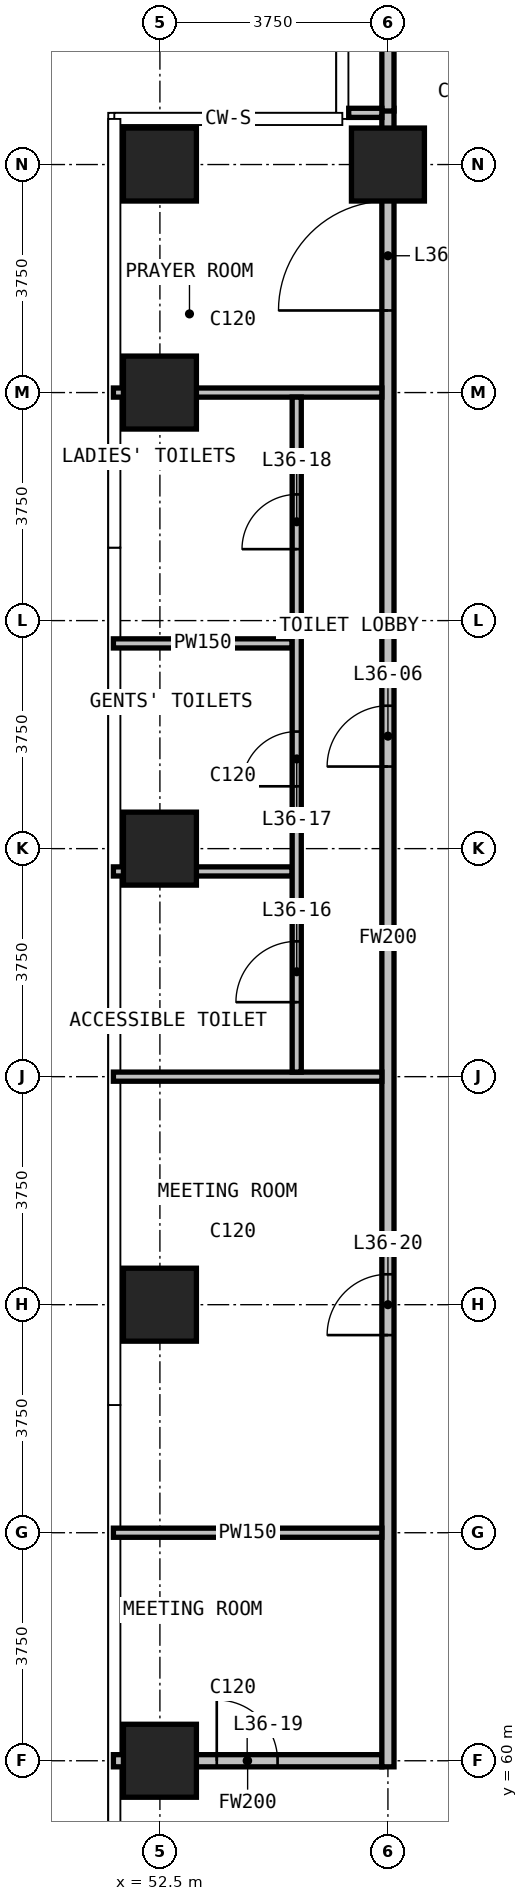
"""IFC4 building model, lengths in metres.
Left out: names, types, materials, properties, quantities, classifications, styles, units other than length and angle.
Written with IfcOpenShell. Run it as: python <this file> out.ifc"""

import sys

from ifc_helpers import new_model, si_unit, direction, frame, frame_2d, origin, origin_2d, place, context, subcontext, project, spatial, rectangle, extrude, element, fill, save


model = new_model("IFC4")
c1 = context("Model", 3, precision=1e-05, world=origin(), true_north=direction((0.0, 1.0)))
c2 = subcontext(c1, "Body", "Model", "MODEL_VIEW")
j1 = project(units=[si_unit("LENGTHUNIT", "METRE"), si_unit("PLANEANGLEUNIT", "RADIAN")], contexts=[c1])
p1 = place(None, origin())
s1 = spatial("IfcSite", under=j1, at=p1, CompositionType="ELEMENT")
p2 = place(p1, origin())
s2 = spatial("IfcBuilding", under=s1, at=p2, CompositionType="ELEMENT")
p3 = place(p2, frame((0.0, 0.0, 143.2)))
s3 = spatial("IfcBuildingStorey", under=s2, at=p3, CompositionType="ELEMENT", Elevation=143.2)
for number, where, z_axis, x_axis in (
    (1, (52.5, 60.0, 0.0), (0.0, 0.0, 1.0), (1.0, 0.0, 0.0)),
    (2, (52.5, 67.5, 0.0), (0.0, 0.0, 1.0), (1.0, 0.0, 0.0)),
    (3, (52.5, 75.0, 0.0), (0.0, 0.0, 1.0), (1.0, 0.0, 0.0)),
    (4, (52.5, 82.5, 0.0), (0.0, 0.0, 1.0), (1.0, 0.0, 0.0)),
    (5, (52.5, 86.25, 0.0), (0.0, 0.0, 1.0), (1.0, 0.0, 0.0)),
    (6, (56.25, 86.25, 0.0), (0.0, 0.0, 1.0), (1.0, 0.0, 0.0)),
):
    element("IfcColumn", number, at=place(p3, frame(where, z_axis=z_axis, x_axis=x_axis)), inside=s3, PredefinedType="COLUMN", context=c2, shape_type="SweptSolid", body=[
        extrude(rectangle(XDim=1.2, YDim=1.2, at=origin_2d()), origin(), (0.0, 0.0, 1.0), 4.5),
    ])
p4 = place(p3, frame((51.735, 60.0, 0.0), z_axis=(0.0, 0.0, 1.0), x_axis=(1.0, 0.0, 0.0)))
e7 = element("IfcWall", 7, at=p4, inside=s3, PredefinedType="PARTITIONING", context=c2, shape_type="SweptSolid", body=[
    extrude(rectangle(XDim=4.415, YDim=0.2, at=frame_2d((2.208, 0.0))), origin(), (0.0, 0.0, 1.0), 4.2),
])
p5 = place(p4, frame((1.7, 0.0, 0.0)))
e8 = element("IfcOpeningElement", 8, at=p5, cuts=e7, PredefinedType="OPENING", context=c2, shape_type="SweptSolid", body=[
    extrude(rectangle(XDim=1.0, YDim=2.2, at=frame_2d((0.5, 1.1))), frame((0.0, 0.11, 0.0), z_axis=(0.0, -1.0, 0.0), x_axis=(1.0, 0.0, 0.0)), (0.0, 0.0, 1.0), 0.22),
])
p6 = place(p3, frame((56.25, 59.9, 0.0), z_axis=(0.0, 0.0, 1.0), x_axis=(0.0, 1.0, 0.0)))
e9 = element("IfcWall", 9, at=p6, inside=s3, PredefinedType="PARTITIONING", context=c2, shape_type="SweptSolid", body=[
    extrude(rectangle(XDim=27.275, YDim=0.2, at=frame_2d((13.638, 0.0))), origin(), (0.0, 0.0, 1.0), 4.2),
])
p7 = place(p6, frame((16.45, 0.0, 0.0)))
e10 = element("IfcOpeningElement", 10, at=p7, cuts=e9, PredefinedType="OPENING", context=c2, shape_type="SweptSolid", body=[
    extrude(rectangle(XDim=1.0, YDim=2.2, at=frame_2d((0.5, 1.1))), frame((0.0, 0.11, 0.0), z_axis=(0.0, -1.0, 0.0), x_axis=(1.0, 0.0, 0.0)), (0.0, 0.0, 1.0), 0.22),
])
p8 = place(p6, frame((7.1, 0.0, 0.0)))
e11 = element("IfcOpeningElement", 11, at=p8, cuts=e9, PredefinedType="OPENING", context=c2, shape_type="SweptSolid", body=[
    extrude(rectangle(XDim=1.0, YDim=2.2, at=frame_2d((0.5, 1.1))), frame((0.0, 0.11, 0.0), z_axis=(0.0, -1.0, 0.0), x_axis=(1.0, 0.0, 0.0)), (0.0, 0.0, 1.0), 0.22),
])
p9 = place(p6, frame((23.95, 0.0, 0.0)))
e12 = element("IfcOpeningElement", 12, at=p9, cuts=e9, PredefinedType="OPENING", context=c2, shape_type="SweptSolid", body=[
    extrude(rectangle(XDim=1.8, YDim=2.2, at=frame_2d((0.9, 1.1))), frame((0.0, 0.11, 0.0), z_axis=(0.0, -1.0, 0.0), x_axis=(1.0, 0.0, 0.0)), (0.0, 0.0, 1.0), 0.22),
])
p10 = place(p3, frame((56.25, 87.13, 0.0), z_axis=(0.0, 0.0, 1.0), x_axis=(0.0, 1.0, 0.0)))
e13 = element("IfcWall", 13, at=p10, inside=s3, PredefinedType="PARTITIONING", context=c2, shape_type="SweptSolid", body=[
    extrude(rectangle(XDim=3.515, YDim=0.2, at=frame_2d((1.758, 0.0))), origin(), (0.0, 0.0, 1.0), 4.2),
])
for number, where, z_axis, x_axis in (
    (14, (51.735, 63.75, 0.0), (0.0, 0.0, 1.0), (1.0, 0.0, 0.0)),
    (15, (51.735, 71.25, 0.0), (0.0, 0.0, 1.0), (1.0, 0.0, 0.0)),
):
    element("IfcWall", number, at=place(p3, frame(where, z_axis=z_axis, x_axis=x_axis)), inside=s3, PredefinedType="PARTITIONING", context=c2, shape_type="SweptSolid", body=[
        extrude(rectangle(XDim=4.415, YDim=0.15, at=frame_2d((2.208, 0.0))), origin(), (0.0, 0.0, 1.0), 4.2),
    ])
for number, where, z_axis, x_axis in (
    (16, (51.735, 74.625, 0.0), (0.0, 0.0, 1.0), (1.0, 0.0, 0.0)),
    (17, (51.735, 78.375, 0.0), (0.0, 0.0, 1.0), (1.0, 0.0, 0.0)),
):
    element("IfcWall", number, at=place(p3, frame(where, z_axis=z_axis, x_axis=x_axis)), inside=s3, PredefinedType="PARTITIONING", context=c2, shape_type="SweptSolid", body=[
        extrude(rectangle(XDim=2.94, YDim=0.15, at=frame_2d((1.47, 0.0))), origin(), (0.0, 0.0, 1.0), 4.2),
    ])
p11 = place(p3, frame((51.735, 82.5, 0.0), z_axis=(0.0, 0.0, 1.0), x_axis=(1.0, 0.0, 0.0)))
e18 = element("IfcWall", 18, at=p11, inside=s3, PredefinedType="PARTITIONING", context=c2, shape_type="SweptSolid", body=[
    extrude(rectangle(XDim=4.415, YDim=0.15, at=frame_2d((2.208, 0.0))), origin(), (0.0, 0.0, 1.0), 4.2),
])
p12 = place(p3, frame((55.605, 87.1, 0.0), z_axis=(0.0, 0.0, 1.0), x_axis=(1.0, 0.0, 0.0)))
e19 = element("IfcWall", 19, at=p12, inside=s3, PredefinedType="PARTITIONING", context=c2, shape_type="SweptSolid", body=[
    extrude(rectangle(XDim=0.545, YDim=0.15, at=frame_2d((0.272, 0.0))), origin(), (0.0, 0.0, 1.0), 4.2),
])
p13 = place(p3, frame((54.75, 71.325, 0.0), z_axis=(0.0, 0.0, 1.0), x_axis=(0.0, 1.0, 0.0)))
e20 = element("IfcWall", 20, at=p13, inside=s3, PredefinedType="PARTITIONING", context=c2, shape_type="SweptSolid", body=[
    extrude(rectangle(XDim=11.1, YDim=0.15, at=frame_2d((5.55, 0.0))), origin(), (0.0, 0.0, 1.0), 4.2),
])
p14 = place(p13, frame((1.15, 0.0, 0.0)))
e21 = element("IfcOpeningElement", 21, at=p14, cuts=e20, PredefinedType="OPENING", context=c2, shape_type="SweptSolid", body=[
    extrude(rectangle(XDim=1.0, YDim=2.2, at=frame_2d((0.5, 1.1))), frame((0.0, 0.085, 0.0), z_axis=(0.0, -1.0, 0.0), x_axis=(1.0, 0.0, 0.0)), (0.0, 0.0, 1.0), 0.17),
])
p15 = place(p13, frame((4.7, 0.0, 0.0)))
e22 = element("IfcOpeningElement", 22, at=p15, cuts=e20, PredefinedType="OPENING", context=c2, shape_type="SweptSolid", body=[
    extrude(rectangle(XDim=0.9, YDim=2.2, at=frame_2d((0.45, 1.1))), frame((0.0, 0.085, 0.0), z_axis=(0.0, -1.0, 0.0), x_axis=(1.0, 0.0, 0.0)), (0.0, 0.0, 1.0), 0.17),
])
p16 = place(p13, frame((8.6, 0.0, 0.0)))
e23 = element("IfcOpeningElement", 23, at=p16, cuts=e20, PredefinedType="OPENING", context=c2, shape_type="SweptSolid", body=[
    extrude(rectangle(XDim=0.9, YDim=2.2, at=frame_2d((0.45, 1.1))), frame((0.0, 0.085, 0.0), z_axis=(0.0, -1.0, 0.0), x_axis=(1.0, 0.0, 0.0)), (0.0, 0.0, 1.0), 0.17),
])
p17 = place(p7, origin())
e24 = element("IfcDoor", 24, at=p17, inside=s3, OperationType="SINGLE_SWING_LEFT", PredefinedType="DOOR", context=c2, shape_type="SweptSolid", body=[
    extrude(rectangle(XDim=1.0, YDim=2.2, at=frame_2d((0.5, 1.1))), frame((0.0, 0.025, 0.0), z_axis=(0.0, -1.0, 0.0), x_axis=(1.0, 0.0, 0.0)), (0.0, 0.0, 1.0), 0.05),
])
fill(e10, e24)
p18 = place(p14, origin())
e25 = element("IfcDoor", 25, at=p18, inside=s3, OperationType="SINGLE_SWING_LEFT", PredefinedType="DOOR", context=c2, shape_type="SweptSolid", body=[
    extrude(rectangle(XDim=1.0, YDim=2.2, at=frame_2d((0.5, 1.1))), frame((0.0, 0.025, 0.0), z_axis=(0.0, -1.0, 0.0), x_axis=(1.0, 0.0, 0.0)), (0.0, 0.0, 1.0), 0.05),
])
fill(e21, e25)
p19 = place(p15, origin())
e26 = element("IfcDoor", 26, at=p19, inside=s3, OperationType="SINGLE_SWING_LEFT", PredefinedType="DOOR", context=c2, shape_type="SweptSolid", body=[
    extrude(rectangle(XDim=0.9, YDim=2.2, at=frame_2d((0.45, 1.1))), frame((0.0, 0.025, 0.0), z_axis=(0.0, -1.0, 0.0), x_axis=(1.0, 0.0, 0.0)), (0.0, 0.0, 1.0), 0.05),
])
fill(e22, e26)
p20 = place(p16, origin())
e27 = element("IfcDoor", 27, at=p20, inside=s3, OperationType="SINGLE_SWING_RIGHT", PredefinedType="DOOR", context=c2, shape_type="SweptSolid", body=[
    extrude(rectangle(XDim=0.9, YDim=2.2, at=frame_2d((0.45, 1.1))), frame((0.0, 0.025, 0.0), z_axis=(0.0, -1.0, 0.0), x_axis=(1.0, 0.0, 0.0)), (0.0, 0.0, 1.0), 0.05),
])
fill(e23, e27)
p21 = place(p5, origin())
e28 = element("IfcDoor", 28, at=p21, inside=s3, OperationType="SINGLE_SWING_RIGHT", PredefinedType="DOOR", context=c2, shape_type="SweptSolid", body=[
    extrude(rectangle(XDim=1.0, YDim=2.2, at=frame_2d((0.5, 1.1))), frame((0.0, 0.025, 0.0), z_axis=(0.0, -1.0, 0.0), x_axis=(1.0, 0.0, 0.0)), (0.0, 0.0, 1.0), 0.05),
])
fill(e8, e28)
p22 = place(p8, origin())
e29 = element("IfcDoor", 29, at=p22, inside=s3, OperationType="SINGLE_SWING_LEFT", PredefinedType="DOOR", context=c2, shape_type="SweptSolid", body=[
    extrude(rectangle(XDim=1.0, YDim=2.2, at=frame_2d((0.5, 1.1))), frame((0.0, 0.025, 0.0), z_axis=(0.0, -1.0, 0.0), x_axis=(1.0, 0.0, 0.0)), (0.0, 0.0, 1.0), 0.05),
])
fill(e11, e29)
p23 = place(p9, origin())
e30 = element("IfcDoor", 30, at=p23, inside=s3, OperationType="DOUBLE_DOOR_SINGLE_SWING", PredefinedType="DOOR", context=c2, shape_type="SweptSolid", body=[
    extrude(rectangle(XDim=1.8, YDim=2.2, at=frame_2d((0.9, 1.1))), frame((0.0, 0.025, 0.0), z_axis=(0.0, -1.0, 0.0), x_axis=(1.0, 0.0, 0.0)), (0.0, 0.0, 1.0), 0.05),
])
fill(e12, e30)
save(model, sys.argv[1])
